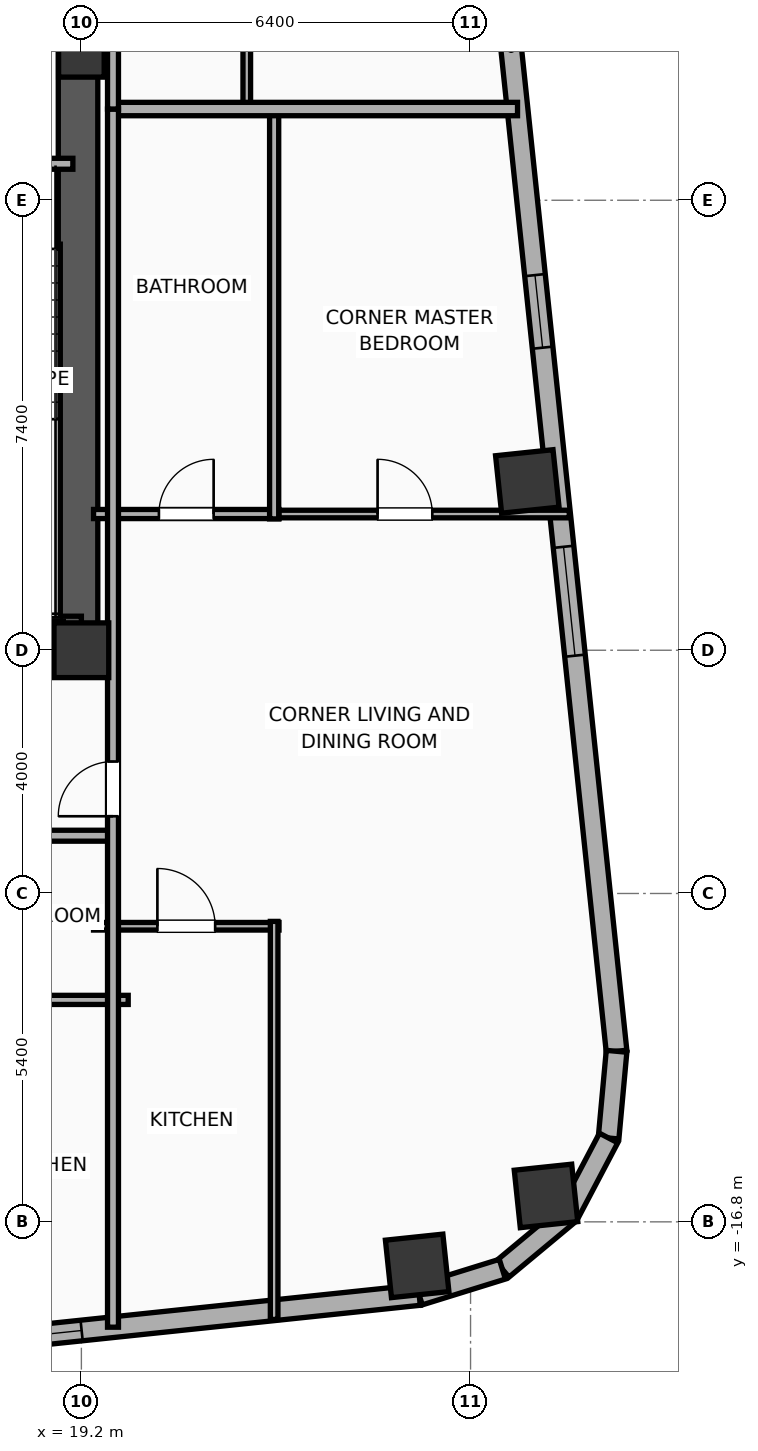
"""IFC4 building model, lengths in metres.
Left out: names, types, materials, properties, quantities, classifications, styles, units other than length and angle.
Written with IfcOpenShell. Run it as: python <this file> out.ifc"""

import sys

from ifc_helpers import new_model, si_unit, direction, frame, frame_2d, origin, origin_2d, place, context, subcontext, project, spatial, rectangle, hollow_rectangle, hollow_circle, extrude, element, fill, save


model = new_model("IFC4")
c1 = context("Model", 3, precision=1e-05, world=origin(), true_north=direction((0.0, 1.0)))
c2 = subcontext(c1, "Body", "Model", "MODEL_VIEW")
j1 = project(units=[si_unit("LENGTHUNIT", "METRE"), si_unit("PLANEANGLEUNIT", "RADIAN")], contexts=[c1])
p1 = place(None, origin())
s1 = spatial("IfcSite", under=j1, at=p1, CompositionType="ELEMENT")
p2 = place(p1, origin())
s2 = spatial("IfcBuilding", under=s1, at=p2, CompositionType="ELEMENT")
p3 = place(p2, frame((0.0, 0.0, 156.0)))
s3 = spatial("IfcBuildingStorey", under=s2, at=p3, CompositionType="ELEMENT", Elevation=156.0)
p4 = place(p3, frame((19.2, -7.4, 0.0), z_axis=(0.0, 0.0, 1.0), x_axis=(1.0, 0.0, 0.0)))
e1 = element("IfcColumn", 1, at=p4, inside=s3, PredefinedType="COLUMN", context=c2, shape_type="SweptSolid", body=[
    extrude(rectangle(XDim=0.9, YDim=0.9, at=origin_2d()), origin(), (0.0, 0.0, 1.0), 3.9),
])
p5 = place(p3, frame((19.2, 2.4, 0.0), z_axis=(0.0, 0.0, 1.0), x_axis=(1.0, 0.0, 0.0)))
e2 = element("IfcColumn", 2, at=p5, inside=s3, PredefinedType="COLUMN", context=c2, shape_type="SweptSolid", body=[
    extrude(rectangle(XDim=0.75, YDim=0.75, at=origin_2d()), origin(), (0.0, 0.0, 1.0), 3.9),
])
p6 = place(p3, frame((12.175, -7.4, 0.0), z_axis=(0.0, 0.0, 1.0), x_axis=(1.0, 0.0, 0.0)))
e3 = element("IfcWall", 3, at=p6, inside=s3, PredefinedType="SHEAR", context=c2, shape_type="SweptSolid", body=[
    extrude(rectangle(XDim=7.25, YDim=0.45, at=frame_2d((3.625, 0.0))), origin(), (0.0, 0.0, 1.0), 3.65),
])
p7 = place(p3, frame((19.145, -7.4, 0.0), z_axis=(0.0, 0.0, 1.0), x_axis=(0.0, 1.0, 0.0)))
e4 = element("IfcWall", 4, at=p7, inside=s3, PredefinedType="SHEAR", context=c2, shape_type="SweptSolid", body=[
    extrude(rectangle(XDim=14.8, YDim=0.65, at=frame_2d((7.4, 0.0))), origin(), (0.0, 0.0, 1.0), 3.65),
])
p8 = place(p3, frame((15.74, -6.965, 0.0), z_axis=(0.0, 0.0, 1.0), x_axis=(1.0, 0.0, 0.0)))
e5 = element("IfcWall", 5, at=p8, inside=s3, PredefinedType="SOLIDWALL", context=c2, shape_type="SweptSolid", body=[
    extrude(rectangle(XDim=3.46, YDim=0.25, at=frame_2d((1.73, 0.0))), origin(), (0.0, 0.0, 1.0), 3.65),
])
p9 = place(p3, frame((24.722, -17.524, 0.0), z_axis=(0.0, 0.0, 1.0), x_axis=(0.994521895368, 0.104528463268, 0.0)))
e6 = element("IfcColumn", 6, at=p9, inside=s3, PredefinedType="COLUMN", context=c2, shape_type="SweptSolid", body=[
    extrude(hollow_rectangle(XDim=0.95, YDim=0.95, WallThickness=0.032, at=origin_2d()), origin(), (0.0, 0.0, 1.0), 3.9),
])
p10 = place(p3, frame((26.841, -16.374, 0.0), z_axis=(0.0, 0.0, 1.0), x_axis=(0.994521895368, 0.104528463268, 0.0)))
e7 = element("IfcColumn", 7, at=p10, inside=s3, PredefinedType="COLUMN", context=c2, shape_type="SweptSolid", body=[
    extrude(hollow_circle(Radius=0.475, WallThickness=0.032, at=origin_2d()), origin(), (0.0, 0.0, 1.0), 3.9),
])
p11 = place(p3, frame((26.533, -4.624, 0.0), z_axis=(0.0, 0.0, 1.0), x_axis=(0.994521895368, 0.104528463268, 0.0)))
e8 = element("IfcColumn", 8, at=p11, inside=s3, PredefinedType="COLUMN", context=c2, shape_type="SweptSolid", body=[
    extrude(hollow_rectangle(XDim=0.95, YDim=0.95, WallThickness=0.032, at=origin_2d()), origin(), (0.0, 0.0, 1.0), 3.9),
])
p12 = place(p3, frame((24.756, -18.003, 0.0), z_axis=(0.0, 0.0, 1.0), x_axis=(-0.99452160744, -0.104531202687, 0.0)))
e9 = element("IfcWall", 9, at=p12, inside=s3, PredefinedType="ELEMENTEDWALL", context=c2, shape_type="SweptSolid", body=[
    extrude(rectangle(XDim=51.967, YDim=0.34, at=frame_2d((25.983, 0.0))), origin(), (0.0, 0.0, 1.0), 3.65),
])
p13 = place(p12, frame((25.633, 0.0, 0.75)))
e10 = element("IfcOpeningElement", 10, at=p13, cuts=e9, PredefinedType="OPENING", context=c2, shape_type="SweptSolid", body=[
    extrude(rectangle(XDim=2.4, YDim=2.1, at=frame_2d((1.2, 1.05))), frame((0.0, 0.18, 0.0), z_axis=(0.0, -1.0, 0.0), x_axis=(1.0, 0.0, 0.0)), (0.0, 0.0, 1.0), 0.36),
])
p14 = place(p12, frame((42.369, 0.0, 0.75)))
e11 = element("IfcOpeningElement", 11, at=p14, cuts=e9, PredefinedType="OPENING", context=c2, shape_type="SweptSolid", body=[
    extrude(rectangle(XDim=1.2, YDim=2.05, at=frame_2d((0.6, 1.025))), frame((0.0, 0.18, 0.0), z_axis=(0.0, -1.0, 0.0), x_axis=(1.0, 0.0, 0.0)), (0.0, 0.0, 1.0), 0.36),
])
p15 = place(p12, frame((34.085, 0.0, 0.75)))
e12 = element("IfcOpeningElement", 12, at=p15, cuts=e9, PredefinedType="OPENING", context=c2, shape_type="SweptSolid", body=[
    extrude(rectangle(XDim=1.2, YDim=2.05, at=frame_2d((0.6, 1.025))), frame((0.0, 0.18, 0.0), z_axis=(0.0, -1.0, 0.0), x_axis=(1.0, 0.0, 0.0)), (0.0, 0.0, 1.0), 0.36),
])
p16 = place(p12, frame((36.993, 0.0, 0.75)))
e13 = element("IfcOpeningElement", 13, at=p16, cuts=e9, PredefinedType="OPENING", context=c2, shape_type="SweptSolid", body=[
    extrude(rectangle(XDim=1.2, YDim=2.05, at=frame_2d((0.6, 1.025))), frame((0.0, 0.18, 0.0), z_axis=(0.0, -1.0, 0.0), x_axis=(1.0, 0.0, 0.0)), (0.0, 0.0, 1.0), 0.36),
])
p17 = place(p12, frame((14.397, 0.0, 0.75)))
e14 = element("IfcOpeningElement", 14, at=p17, cuts=e9, PredefinedType="OPENING", context=c2, shape_type="SweptSolid", body=[
    extrude(rectangle(XDim=1.2, YDim=2.05, at=frame_2d((0.6, 1.025))), frame((0.0, 0.18, 0.0), z_axis=(0.0, -1.0, 0.0), x_axis=(1.0, 0.0, 0.0)), (0.0, 0.0, 1.0), 0.36),
])
p18 = place(p12, frame((11.489, 0.0, 0.75)))
e15 = element("IfcOpeningElement", 15, at=p18, cuts=e9, PredefinedType="OPENING", context=c2, shape_type="SweptSolid", body=[
    extrude(rectangle(XDim=1.2, YDim=2.05, at=frame_2d((0.6, 1.025))), frame((0.0, 0.18, 0.0), z_axis=(0.0, -1.0, 0.0), x_axis=(1.0, 0.0, 0.0)), (0.0, 0.0, 1.0), 0.36),
])
p19 = place(p12, frame((8.521, 0.0, 0.75)))
e16 = element("IfcOpeningElement", 16, at=p19, cuts=e9, PredefinedType="OPENING", context=c2, shape_type="SweptSolid", body=[
    extrude(rectangle(XDim=1.2, YDim=2.05, at=frame_2d((0.6, 1.025))), frame((0.0, 0.18, 0.0), z_axis=(0.0, -1.0, 0.0), x_axis=(1.0, 0.0, 0.0)), (0.0, 0.0, 1.0), 0.36),
])
p20 = place(p12, frame((5.582, 0.0, 0.75)))
e17 = element("IfcOpeningElement", 17, at=p20, cuts=e9, PredefinedType="OPENING", context=c2, shape_type="SweptSolid", body=[
    extrude(rectangle(XDim=1.2, YDim=2.05, at=frame_2d((0.6, 1.025))), frame((0.0, 0.18, 0.0), z_axis=(0.0, -1.0, 0.0), x_axis=(1.0, 0.0, 0.0)), (0.0, 0.0, 1.0), 0.36),
])
p21 = place(p12, frame((29.313, 0.0, 0.75)))
e18 = element("IfcOpeningElement", 18, at=p21, cuts=e9, PredefinedType="OPENING", context=c2, shape_type="SweptSolid", body=[
    extrude(rectangle(XDim=1.2, YDim=2.05, at=frame_2d((0.6, 1.025))), frame((0.0, 0.18, 0.0), z_axis=(0.0, -1.0, 0.0), x_axis=(1.0, 0.0, 0.0)), (0.0, 0.0, 1.0), 0.36),
])
p22 = place(p12, frame((22.248, 0.0, 0.75)))
e19 = element("IfcOpeningElement", 19, at=p22, cuts=e9, PredefinedType="OPENING", context=c2, shape_type="SweptSolid", body=[
    extrude(rectangle(XDim=1.2, YDim=2.05, at=frame_2d((0.6, 1.025))), frame((0.0, 0.18, 0.0), z_axis=(0.0, -1.0, 0.0), x_axis=(1.0, 0.0, 0.0)), (0.0, 0.0, 1.0), 0.36),
])
p23 = place(p12, frame((18.186, 0.0, 0.75)))
e20 = element("IfcOpeningElement", 20, at=p23, cuts=e9, PredefinedType="OPENING", context=c2, shape_type="SweptSolid", body=[
    extrude(rectangle(XDim=1.2, YDim=2.05, at=frame_2d((0.6, 1.025))), frame((0.0, 0.18, 0.0), z_axis=(0.0, -1.0, 0.0), x_axis=(1.0, 0.0, 0.0)), (0.0, 0.0, 1.0), 0.36),
])
p24 = place(p12, frame((47.879, 0.0, 0.75)))
e21 = element("IfcOpeningElement", 21, at=p24, cuts=e9, PredefinedType="OPENING", context=c2, shape_type="SweptSolid", body=[
    extrude(rectangle(XDim=1.2, YDim=2.05, at=frame_2d((0.6, 1.025))), frame((0.0, 0.18, 0.0), z_axis=(0.0, -1.0, 0.0), x_axis=(1.0, 0.0, 0.0)), (0.0, 0.0, 1.0), 0.36),
])
p25 = place(p12, frame((49.844, 0.0, 0.75)))
e22 = element("IfcOpeningElement", 22, at=p25, cuts=e9, PredefinedType="OPENING", context=c2, shape_type="SweptSolid", body=[
    extrude(rectangle(XDim=1.2, YDim=2.05, at=frame_2d((0.6, 1.025))), frame((0.0, 0.18, 0.0), z_axis=(0.0, -1.0, 0.0), x_axis=(1.0, 0.0, 0.0)), (0.0, 0.0, 1.0), 0.36),
])
p26 = place(p3, frame((24.534, 18.99, 0.0), z_axis=(0.0, 0.0, 1.0), x_axis=(0.104534959766, -0.994521212537, 0.0)))
e23 = element("IfcWall", 23, at=p26, inside=s3, PredefinedType="ELEMENTEDWALL", context=c2, shape_type="SweptSolid", body=[
    extrude(rectangle(XDim=33.166, YDim=0.34, at=frame_2d((16.583, 0.0))), origin(), (0.0, 0.0, 1.0), 3.65),
])
p27 = place(p26, frame((6.542, 0.0, 0.75)))
e24 = element("IfcOpeningElement", 24, at=p27, cuts=e23, PredefinedType="OPENING", context=c2, shape_type="SweptSolid", body=[
    extrude(rectangle(XDim=1.8, YDim=2.1, at=frame_2d((0.9, 1.05))), frame((0.0, 0.18, 0.0), z_axis=(0.0, -1.0, 0.0), x_axis=(1.0, 0.0, 0.0)), (0.0, 0.0, 1.0), 0.36),
])
p28 = place(p26, frame((24.825, 0.0, 0.75)))
e25 = element("IfcOpeningElement", 25, at=p28, cuts=e23, PredefinedType="OPENING", context=c2, shape_type="SweptSolid", body=[
    extrude(rectangle(XDim=1.8, YDim=2.1, at=frame_2d((0.9, 1.05))), frame((0.0, 0.18, 0.0), z_axis=(0.0, -1.0, 0.0), x_axis=(1.0, 0.0, 0.0)), (0.0, 0.0, 1.0), 0.36),
])
p29 = place(p26, frame((20.332, 0.0, 0.75)))
e26 = element("IfcOpeningElement", 26, at=p29, cuts=e23, PredefinedType="OPENING", context=c2, shape_type="SweptSolid", body=[
    extrude(rectangle(XDim=1.2, YDim=2.05, at=frame_2d((0.6, 1.025))), frame((0.0, 0.18, 0.0), z_axis=(0.0, -1.0, 0.0), x_axis=(1.0, 0.0, 0.0)), (0.0, 0.0, 1.0), 0.36),
])
p30 = place(p3, frame((28.001, -13.995, 0.0), z_axis=(0.0, 0.0, 1.0), x_axis=(-0.091534682358, -0.995801888894, 0.0)))
e27 = element("IfcWall", 27, at=p30, inside=s3, PredefinedType="ELEMENTEDWALL", context=c2, shape_type="SweptSolid", body=[
    extrude(rectangle(XDim=1.432, YDim=0.34, at=frame_2d((0.716, 0.0))), origin(), (0.0, 0.0, 1.0), 3.65),
])
for number, where, z_axis, x_axis in (
    (28, (27.87, -15.421, 0.0), (0.0, 0.0, 1.0), (-0.466, -0.885, 0.0)),
    (29, (27.211, -16.674, 0.0), (0.0, 0.0, 1.0), (-0.769, -0.64, 0.0)),
):
    element("IfcWall", number, at=place(p3, frame(where, z_axis=z_axis, x_axis=x_axis)), inside=s3, PredefinedType="ELEMENTEDWALL", context=c2, shape_type="SweptSolid", body=[
        extrude(rectangle(XDim=1.415, YDim=0.34, at=frame_2d((0.708, 0.0))), origin(), (0.0, 0.0, 1.0), 3.65),
    ])
p31 = place(p3, frame((26.123, -17.579, 0.0), z_axis=(0.0, 0.0, 1.0), x_axis=(-0.955042500381, -0.296468923271, 0.0)))
e30 = element("IfcWall", 30, at=p31, inside=s3, PredefinedType="ELEMENTEDWALL", context=c2, shape_type="SweptSolid", body=[
    extrude(rectangle(XDim=1.432, YDim=0.34, at=frame_2d((0.716, 0.0))), origin(), (0.0, 0.0, 1.0), 3.65),
])
p32 = place(p3, frame((15.7, 0.6, 0.0), z_axis=(0.0, 0.0, 1.0), x_axis=(1.0, 0.0, 0.0)))
e31 = element("IfcWall", 31, at=p32, inside=s3, PredefinedType="PARTITIONING", context=c2, shape_type="SweptSolid", body=[
    extrude(rectangle(XDim=3.36, YDim=0.18, at=frame_2d((1.68, 0.0))), origin(), (0.0, 0.0, 1.0), 3.65),
])
p33 = place(p32, frame((1.155, 0.0, 0.0)))
e32 = element("IfcOpeningElement", 32, at=p33, cuts=e31, PredefinedType="OPENING", context=c2, shape_type="SweptSolid", body=[
    extrude(rectangle(XDim=1.05, YDim=2.05, at=frame_2d((0.525, 1.025))), frame((0.0, 0.1, 0.0), z_axis=(0.0, -1.0, 0.0), x_axis=(1.0, 0.0, 0.0)), (0.0, 0.0, 1.0), 0.2),
])
p34 = place(p3, frame((17.42, -13.15, 0.0), z_axis=(0.0, 0.0, 1.0), x_axis=(1.0, 0.0, 0.0)))
e33 = element("IfcWall", 33, at=p34, inside=s3, PredefinedType="PLUMBINGWALL", context=c2, shape_type="SweptSolid", body=[
    extrude(rectangle(XDim=2.55, YDim=0.15, at=frame_2d((1.275, 0.0))), origin(), (0.0, 0.0, 1.0), 3.65),
])
p35 = place(p3, frame((8.08, -10.45, 0.0), z_axis=(0.0, 0.0, 1.0), x_axis=(1.0, 0.0, 0.0)))
e34 = element("IfcWall", 34, at=p35, inside=s3, PredefinedType="PARTITIONING", context=c2, shape_type="SweptSolid", body=[
    extrude(rectangle(XDim=11.67, YDim=0.18, at=frame_2d((5.835, 0.0))), origin(), (0.0, 0.0, 1.0), 3.65),
])
p36 = place(p35, frame((1.213, 0.0, 0.0)))
e35 = element("IfcOpeningElement", 35, at=p36, cuts=e34, PredefinedType="OPENING", context=c2, shape_type="SweptSolid", body=[
    extrude(rectangle(XDim=1.15, YDim=2.05, at=frame_2d((0.575, 1.025))), frame((0.0, 0.1, 0.0), z_axis=(0.0, -1.0, 0.0), x_axis=(1.0, 0.0, 0.0)), (0.0, 0.0, 1.0), 0.2),
])
p37 = place(p35, frame((7.057, 0.0, 0.0)))
e36 = element("IfcOpeningElement", 36, at=p37, cuts=e34, PredefinedType="OPENING", context=c2, shape_type="SweptSolid", body=[
    extrude(rectangle(XDim=1.15, YDim=2.05, at=frame_2d((0.575, 1.025))), frame((0.0, 0.1, 0.0), z_axis=(0.0, -1.0, 0.0), x_axis=(1.0, 0.0, 0.0)), (0.0, 0.0, 1.0), 0.2),
])
p38 = place(p3, frame((22.31, -5.16, 0.0), z_axis=(0.0, 0.0, 1.0), x_axis=(1.0, 0.0, 0.0)))
e37 = element("IfcWall", 37, at=p38, inside=s3, PredefinedType="PARTITIONING", context=c2, shape_type="SweptSolid", body=[
    extrude(rectangle(XDim=4.913, YDim=0.125, at=frame_2d((2.457, 0.0))), origin(), (0.0, 0.0, 1.0), 3.04),
])
p39 = place(p38, frame((1.761, 0.0, 0.0)))
e38 = element("IfcOpeningElement", 38, at=p39, cuts=e37, PredefinedType="OPENING", context=c2, shape_type="SweptSolid", body=[
    extrude(rectangle(XDim=0.9, YDim=2.05, at=frame_2d((0.45, 1.025))), frame((0.0, 0.073, 0.0), z_axis=(0.0, -1.0, 0.0), x_axis=(1.0, 0.0, 0.0)), (0.0, 0.0, 1.0), 0.145),
])
p40 = place(p3, frame((19.4, -11.939, 0.0), z_axis=(0.0, 0.0, 1.0), x_axis=(1.0, 0.0, 0.0)))
e39 = element("IfcWall", 39, at=p40, inside=s3, PredefinedType="PARTITIONING", context=c2, shape_type="SweptSolid", body=[
    extrude(rectangle(XDim=3.05, YDim=0.125, at=frame_2d((1.525, 0.0))), origin(), (0.0, 0.0, 1.0), 3.65),
])
p41 = place(p40, frame((1.05, 0.0, 0.0)))
e40 = element("IfcOpeningElement", 40, at=p41, cuts=e39, PredefinedType="OPENING", context=c2, shape_type="SweptSolid", body=[
    extrude(rectangle(XDim=0.95, YDim=2.05, at=frame_2d((0.475, 1.025))), frame((0.0, 0.073, 0.0), z_axis=(0.0, -1.0, 0.0), x_axis=(1.0, 0.0, 0.0)), (0.0, 0.0, 1.0), 0.145),
])
p42 = place(p3, frame((19.4, -5.16, 0.0), z_axis=(0.0, 0.0, 1.0), x_axis=(1.0, 0.0, 0.0)))
e41 = element("IfcWall", 41, at=p42, inside=s3, PredefinedType="PLUMBINGWALL", context=c2, shape_type="SweptSolid", body=[
    extrude(rectangle(XDim=3.05, YDim=0.15, at=frame_2d((1.525, 0.0))), origin(), (0.0, 0.0, 1.0), 3.65),
])
p43 = place(p42, frame((1.075, 0.0, 0.0)))
e42 = element("IfcOpeningElement", 42, at=p43, cuts=e41, PredefinedType="OPENING", context=c2, shape_type="SweptSolid", body=[
    extrude(rectangle(XDim=0.9, YDim=2.05, at=frame_2d((0.45, 1.025))), frame((0.0, 0.085, 0.0), z_axis=(0.0, -1.0, 0.0), x_axis=(1.0, 0.0, 0.0)), (0.0, 0.0, 1.0), 0.17),
])
p44 = place(p3, frame((22.37, -18.405, 0.0), z_axis=(0.0, 0.0, 1.0), x_axis=(0.0, 1.0, 0.0)))
e43 = element("IfcWall", 43, at=p44, inside=s3, PredefinedType="PARTITIONING", context=c2, shape_type="SweptSolid", body=[
    extrude(rectangle(XDim=6.546, YDim=0.125, at=frame_2d((3.273, 0.0))), origin(), (0.0, 0.0, 1.0), 3.65),
])
p45 = place(p3, frame((22.37, -5.24, 0.0), z_axis=(0.0, 0.0, 1.0), x_axis=(0.0, 1.0, 0.0)))
e44 = element("IfcWall", 44, at=p45, inside=s3, PredefinedType="PLUMBINGWALL", context=c2, shape_type="SweptSolid", body=[
    extrude(rectangle(XDim=6.72, YDim=0.15, at=frame_2d((3.36, 0.0))), origin(), (0.0, 0.0, 1.0), 3.65),
])
p46 = place(p3, frame((21.92, 1.52, 0.0), z_axis=(0.0, 0.0, 1.0), x_axis=(0.0, 1.0, 0.0)))
e45 = element("IfcWall", 45, at=p46, inside=s3, PredefinedType="PARTITIONING", context=c2, shape_type="SweptSolid", body=[
    extrude(rectangle(XDim=6.72, YDim=0.125, at=frame_2d((3.36, 0.0))), origin(), (0.0, 0.0, 1.0), 3.65),
])
p47 = place(p3, frame((19.72, 1.5, 0.0), z_axis=(0.0, 0.0, 1.0), x_axis=(1.0, 0.0, 0.0)))
e46 = element("IfcWall", 46, at=p47, inside=s3, PredefinedType="PARTITIONING", context=c2, shape_type="SweptSolid", body=[
    extrude(rectangle(XDim=6.653, YDim=0.22, at=frame_2d((3.326, 0.0))), origin(), (0.0, 0.0, 1.0), 3.65),
])
p48 = place(p3, frame((19.72, -18.532, 0.0), z_axis=(0.0, 0.0, 1.0), x_axis=(0.0, 1.0, 0.0)))
e47 = element("IfcWall", 47, at=p48, inside=s3, PredefinedType="PARTITIONING", context=c2, shape_type="SweptSolid", body=[
    extrude(rectangle(XDim=20.032, YDim=0.18, at=frame_2d((10.016, 0.0))), origin(), (0.0, 0.0, 1.0), 3.65),
])
p49 = place(p48, frame((8.402, 0.0, 0.0)))
e48 = element("IfcOpeningElement", 48, at=p49, cuts=e47, PredefinedType="OPENING", context=c2, shape_type="SweptSolid", body=[
    extrude(rectangle(XDim=0.9, YDim=2.05, at=frame_2d((0.45, 1.025))), frame((0.0, 0.1, 0.0), z_axis=(0.0, -1.0, 0.0), x_axis=(1.0, 0.0, 0.0)), (0.0, 0.0, 1.0), 0.2),
])
p50 = place(p3, frame((19.72, 1.5, 0.0), z_axis=(0.0, 0.0, 1.0), x_axis=(0.0, 1.0, 0.0)))
e49 = element("IfcWall", 49, at=p50, inside=s3, PredefinedType="PARTITIONING", context=c2, shape_type="SweptSolid", body=[
    extrude(rectangle(XDim=20.65, YDim=0.18, at=frame_2d((10.325, 0.0))), origin(), (0.0, 0.0, 1.0), 3.04),
])
p51 = place(p50, frame((7.729, 0.0, 0.0)))
e50 = element("IfcOpeningElement", 50, at=p51, cuts=e49, PredefinedType="OPENING", context=c2, shape_type="SweptSolid", body=[
    extrude(rectangle(XDim=0.9, YDim=2.05, at=frame_2d((0.45, 1.025))), frame((0.0, 0.1, 0.0), z_axis=(0.0, -1.0, 0.0), x_axis=(1.0, 0.0, 0.0)), (0.0, 0.0, 1.0), 0.2),
])
p52 = place(p28, origin())
e51 = element("IfcWindow", 51, at=p52, inside=s3, PartitioningType="SINGLE_PANEL", PredefinedType="WINDOW", context=c2, shape_type="SweptSolid", body=[
    extrude(rectangle(XDim=1.8, YDim=2.1, at=frame_2d((0.9, 1.05))), frame((0.0, 0.03, 0.0), z_axis=(0.0, -1.0, 0.0), x_axis=(1.0, 0.0, 0.0)), (0.0, 0.0, 1.0), 0.06),
])
fill(e25, e51)
p53 = place(p20, origin())
e52 = element("IfcWindow", 52, at=p53, inside=s3, PartitioningType="SINGLE_PANEL", PredefinedType="WINDOW", context=c2, shape_type="SweptSolid", body=[
    extrude(rectangle(XDim=1.2, YDim=2.05, at=frame_2d((0.6, 1.025))), frame((0.0, 0.03, 0.0), z_axis=(0.0, -1.0, 0.0), x_axis=(1.0, 0.0, 0.0)), (0.0, 0.0, 1.0), 0.06),
])
fill(e17, e52)
p54 = place(p29, origin())
e53 = element("IfcWindow", 53, at=p54, inside=s3, PartitioningType="SINGLE_PANEL", PredefinedType="WINDOW", context=c2, shape_type="SweptSolid", body=[
    extrude(rectangle(XDim=1.2, YDim=2.05, at=frame_2d((0.6, 1.025))), frame((0.0, 0.03, 0.0), z_axis=(0.0, -1.0, 0.0), x_axis=(1.0, 0.0, 0.0)), (0.0, 0.0, 1.0), 0.06),
])
fill(e26, e53)
p55 = place(p39, origin())
e54 = element("IfcDoor", 54, at=p55, inside=s3, OperationType="SINGLE_SWING_LEFT", PredefinedType="DOOR", context=c2, shape_type="SweptSolid", body=[
    extrude(rectangle(XDim=0.9, YDim=2.05, at=frame_2d((0.45, 1.025))), frame((0.0, 0.025, 0.0), z_axis=(0.0, -1.0, 0.0), x_axis=(1.0, 0.0, 0.0)), (0.0, 0.0, 1.0), 0.05),
])
fill(e38, e54)
p56 = place(p41, origin())
e55 = element("IfcDoor", 55, at=p56, inside=s3, OperationType="SINGLE_SWING_LEFT", PredefinedType="DOOR", context=c2, shape_type="SweptSolid", body=[
    extrude(rectangle(XDim=0.95, YDim=2.05, at=frame_2d((0.475, 1.025))), frame((0.0, 0.025, 0.0), z_axis=(0.0, -1.0, 0.0), x_axis=(1.0, 0.0, 0.0)), (0.0, 0.0, 1.0), 0.05),
])
fill(e40, e55)
p57 = place(p43, origin())
e56 = element("IfcDoor", 56, at=p57, inside=s3, OperationType="SINGLE_SWING_RIGHT", PredefinedType="DOOR", context=c2, shape_type="SweptSolid", body=[
    extrude(rectangle(XDim=0.9, YDim=2.05, at=frame_2d((0.45, 1.025))), frame((0.0, 0.025, 0.0), z_axis=(0.0, -1.0, 0.0), x_axis=(1.0, 0.0, 0.0)), (0.0, 0.0, 1.0), 0.05),
])
fill(e42, e56)
p58 = place(p49, origin())
e57 = element("IfcDoor", 57, at=p58, inside=s3, OperationType="SINGLE_SWING_LEFT", PredefinedType="DOOR", context=c2, shape_type="SweptSolid", body=[
    extrude(rectangle(XDim=0.9, YDim=2.05, at=frame_2d((0.45, 1.025))), frame((0.0, 0.025, 0.0), z_axis=(0.0, -1.0, 0.0), x_axis=(1.0, 0.0, 0.0)), (0.0, 0.0, 1.0), 0.05),
])
fill(e48, e57)
save(model, sys.argv[1])
